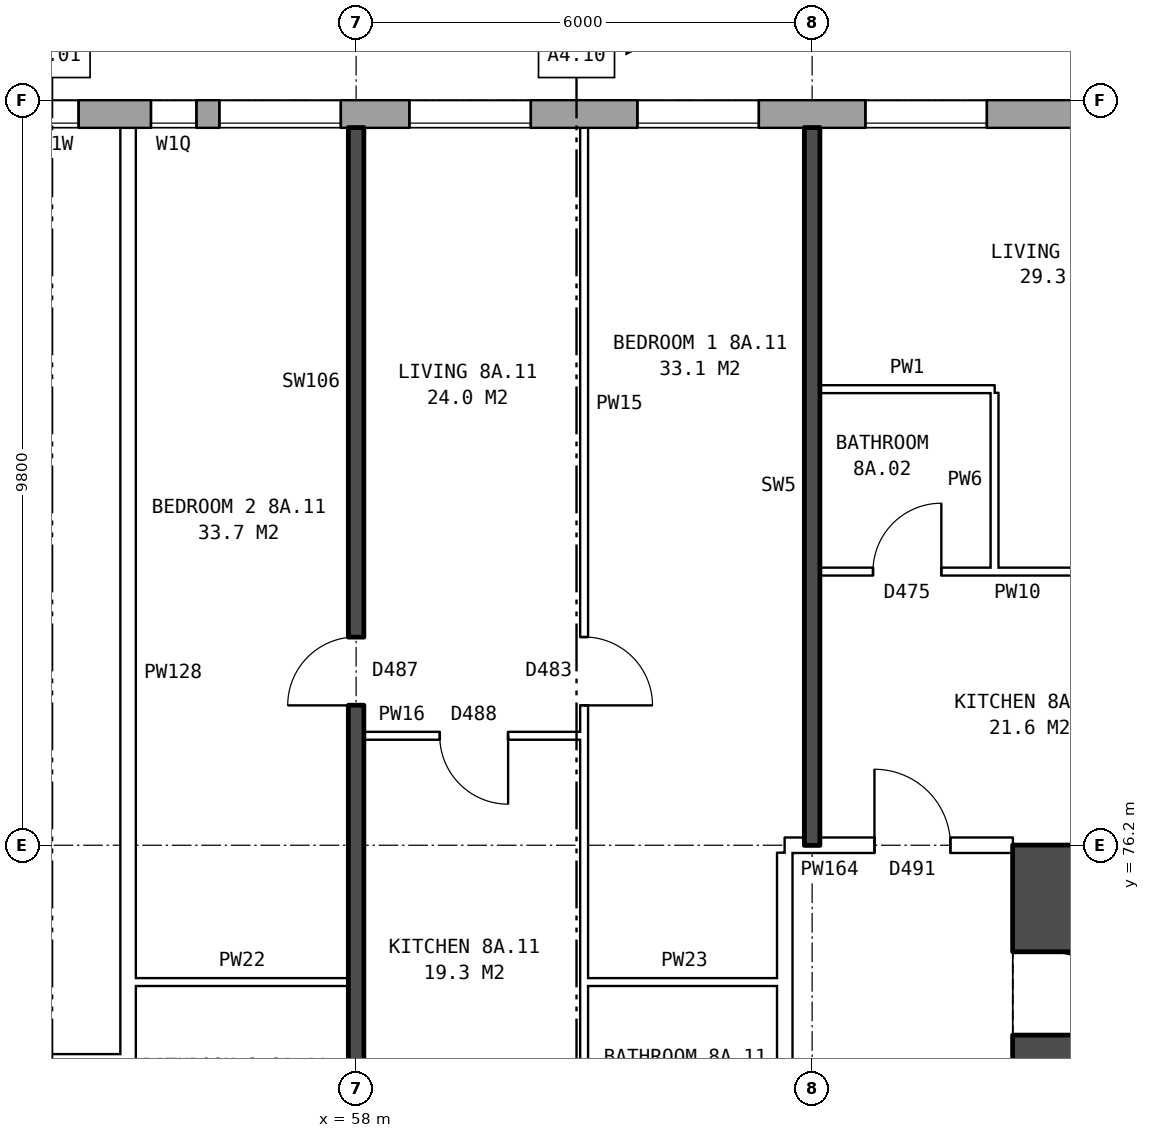
"""IFC4 building model, lengths in metres.
Left out: names, types, materials, properties, quantities, classifications, styles, units other than length and angle.
Written with IfcOpenShell. Run it as: python <this file> out.ifc"""

import sys

from ifc_helpers import new_model, si_unit, direction, frame, frame_2d, origin, place, context, subcontext, project, spatial, rectangle, extrude, element, fill, save


model = new_model("IFC4")
c1 = context("Model", 3, precision=1e-05, world=origin(), true_north=direction((0.0, 1.0)))
c2 = subcontext(c1, "Body", "Model", "MODEL_VIEW")
j1 = project(units=[si_unit("LENGTHUNIT", "METRE"), si_unit("PLANEANGLEUNIT", "RADIAN")], contexts=[c1])
p1 = place(None, origin())
s1 = spatial("IfcSite", under=j1, at=p1, CompositionType="ELEMENT")
p2 = place(p1, origin())
s2 = spatial("IfcBuilding", under=s1, at=p2, CompositionType="ELEMENT")
p3 = place(p2, frame((0.0, 0.0, 31.9)))
s3 = spatial("IfcBuildingStorey", under=s2, at=p3, CompositionType="ELEMENT", Elevation=31.9)
p4 = place(p3, frame((72.925, 85.82, 0.0), z_axis=(0.0, 0.0, 1.0), x_axis=(-1.0, 0.0, 0.0)))
e1 = element("IfcWall", 1, at=p4, inside=s3, PredefinedType="STANDARD", context=c2, shape_type="SweptSolid", body=[
    extrude(rectangle(XDim=50.101, YDim=0.36, at=frame_2d((25.05, 0.0))), origin(), (0.0, 0.0, 1.0), 2.85),
])
p5 = place(p4, frame((0.625, 0.0, 0.8)))
e2 = element("IfcOpeningElement", 2, at=p5, cuts=e1, PredefinedType="OPENING", context=c2, shape_type="SweptSolid", body=[
    extrude(rectangle(XDim=1.6, YDim=1.8, at=frame_2d((0.8, 0.9))), frame((0.0, 0.19, 0.0), z_axis=(0.0, -1.0, 0.0), x_axis=(1.0, 0.0, 0.0)), (0.0, 0.0, 1.0), 0.38),
])
p6 = place(p4, frame((3.625, 0.0, 0.8)))
e3 = element("IfcOpeningElement", 3, at=p6, cuts=e1, PredefinedType="OPENING", context=c2, shape_type="SweptSolid", body=[
    extrude(rectangle(XDim=1.6, YDim=1.8, at=frame_2d((0.8, 0.9))), frame((0.0, 0.19, 0.0), z_axis=(0.0, -1.0, 0.0), x_axis=(1.0, 0.0, 0.0)), (0.0, 0.0, 1.0), 0.38),
])
p7 = place(p4, frame((6.625, 0.0, 0.8)))
e4 = element("IfcOpeningElement", 4, at=p7, cuts=e1, PredefinedType="OPENING", context=c2, shape_type="SweptSolid", body=[
    extrude(rectangle(XDim=1.6, YDim=1.8, at=frame_2d((0.8, 0.9))), frame((0.0, 0.19, 0.0), z_axis=(0.0, -1.0, 0.0), x_axis=(1.0, 0.0, 0.0)), (0.0, 0.0, 1.0), 0.38),
])
p8 = place(p4, frame((9.625, 0.0, 0.8)))
e5 = element("IfcOpeningElement", 5, at=p8, cuts=e1, PredefinedType="OPENING", context=c2, shape_type="SweptSolid", body=[
    extrude(rectangle(XDim=1.6, YDim=1.8, at=frame_2d((0.8, 0.9))), frame((0.0, 0.19, 0.0), z_axis=(0.0, -1.0, 0.0), x_axis=(1.0, 0.0, 0.0)), (0.0, 0.0, 1.0), 0.38),
])
p9 = place(p4, frame((12.625, 0.0, 0.8)))
e6 = element("IfcOpeningElement", 6, at=p9, cuts=e1, PredefinedType="OPENING", context=c2, shape_type="SweptSolid", body=[
    extrude(rectangle(XDim=1.6, YDim=1.8, at=frame_2d((0.8, 0.9))), frame((0.0, 0.19, 0.0), z_axis=(0.0, -1.0, 0.0), x_axis=(1.0, 0.0, 0.0)), (0.0, 0.0, 1.0), 0.38),
])
p10 = place(p4, frame((15.125, 0.0, 0.8)))
e7 = element("IfcOpeningElement", 7, at=p10, cuts=e1, PredefinedType="OPENING", context=c2, shape_type="SweptSolid", body=[
    extrude(rectangle(XDim=1.6, YDim=1.8, at=frame_2d((0.8, 0.9))), frame((0.0, 0.19, 0.0), z_axis=(0.0, -1.0, 0.0), x_axis=(1.0, 0.0, 0.0)), (0.0, 0.0, 1.0), 0.38),
])
p11 = place(p4, frame((18.575, 0.0, 0.15)))
e8 = element("IfcOpeningElement", 8, at=p11, cuts=e1, PredefinedType="OPENING", context=c2, shape_type="SweptSolid", body=[
    extrude(rectangle(XDim=0.6, YDim=0.9, at=frame_2d((0.3, 0.45))), frame((0.0, 0.19, 0.0), z_axis=(0.0, -1.0, 0.0), x_axis=(1.0, 0.0, 0.0)), (0.0, 0.0, 1.0), 0.38),
])
p12 = place(p4, frame((21.625, 0.0, 0.8)))
e9 = element("IfcOpeningElement", 9, at=p12, cuts=e1, PredefinedType="OPENING", context=c2, shape_type="SweptSolid", body=[
    extrude(rectangle(XDim=1.6, YDim=1.8, at=frame_2d((0.8, 0.9))), frame((0.0, 0.19, 0.0), z_axis=(0.0, -1.0, 0.0), x_axis=(1.0, 0.0, 0.0)), (0.0, 0.0, 1.0), 0.38),
])
p13 = place(p4, frame((24.625, 0.0, 0.8)))
e10 = element("IfcOpeningElement", 10, at=p13, cuts=e1, PredefinedType="OPENING", context=c2, shape_type="SweptSolid", body=[
    extrude(rectangle(XDim=1.6, YDim=1.8, at=frame_2d((0.8, 0.9))), frame((0.0, 0.19, 0.0), z_axis=(0.0, -1.0, 0.0), x_axis=(1.0, 0.0, 0.0)), (0.0, 0.0, 1.0), 0.38),
])
p14 = place(p4, frame((27.625, 0.0, 0.8)))
e11 = element("IfcOpeningElement", 11, at=p14, cuts=e1, PredefinedType="OPENING", context=c2, shape_type="SweptSolid", body=[
    extrude(rectangle(XDim=1.6, YDim=1.8, at=frame_2d((0.8, 0.9))), frame((0.0, 0.19, 0.0), z_axis=(0.0, -1.0, 0.0), x_axis=(1.0, 0.0, 0.0)), (0.0, 0.0, 1.0), 0.38),
])
p15 = place(p4, frame((29.525, 0.0, 0.8)))
e12 = element("IfcOpeningElement", 12, at=p15, cuts=e1, PredefinedType="OPENING", context=c2, shape_type="SweptSolid", body=[
    extrude(rectangle(XDim=1.0, YDim=0.9, at=frame_2d((0.5, 0.45))), frame((0.0, 0.19, 0.0), z_axis=(0.0, -1.0, 0.0), x_axis=(1.0, 0.0, 0.0)), (0.0, 0.0, 1.0), 0.38),
])
p16 = place(p4, frame((33.625, 0.0, 0.8)))
e13 = element("IfcOpeningElement", 13, at=p16, cuts=e1, PredefinedType="OPENING", context=c2, shape_type="SweptSolid", body=[
    extrude(rectangle(XDim=1.6, YDim=1.8, at=frame_2d((0.8, 0.9))), frame((0.0, 0.19, 0.0), z_axis=(0.0, -1.0, 0.0), x_axis=(1.0, 0.0, 0.0)), (0.0, 0.0, 1.0), 0.38),
])
p17 = place(p4, frame((36.625, 0.0, 0.8)))
e14 = element("IfcOpeningElement", 14, at=p17, cuts=e1, PredefinedType="OPENING", context=c2, shape_type="SweptSolid", body=[
    extrude(rectangle(XDim=1.6, YDim=1.8, at=frame_2d((0.8, 0.9))), frame((0.0, 0.19, 0.0), z_axis=(0.0, -1.0, 0.0), x_axis=(1.0, 0.0, 0.0)), (0.0, 0.0, 1.0), 0.38),
])
p18 = place(p4, frame((39.625, 0.0, 0.8)))
e15 = element("IfcOpeningElement", 15, at=p18, cuts=e1, PredefinedType="OPENING", context=c2, shape_type="SweptSolid", body=[
    extrude(rectangle(XDim=1.6, YDim=1.8, at=frame_2d((0.8, 0.9))), frame((0.0, 0.19, 0.0), z_axis=(0.0, -1.0, 0.0), x_axis=(1.0, 0.0, 0.0)), (0.0, 0.0, 1.0), 0.38),
])
p19 = place(p4, frame((42.625, 0.0, 0.8)))
e16 = element("IfcOpeningElement", 16, at=p19, cuts=e1, PredefinedType="OPENING", context=c2, shape_type="SweptSolid", body=[
    extrude(rectangle(XDim=1.6, YDim=1.8, at=frame_2d((0.8, 0.9))), frame((0.0, 0.19, 0.0), z_axis=(0.0, -1.0, 0.0), x_axis=(1.0, 0.0, 0.0)), (0.0, 0.0, 1.0), 0.38),
])
p20 = place(p4, frame((45.625, 0.0, 0.8)))
e17 = element("IfcOpeningElement", 17, at=p20, cuts=e1, PredefinedType="OPENING", context=c2, shape_type="SweptSolid", body=[
    extrude(rectangle(XDim=1.6, YDim=1.8, at=frame_2d((0.8, 0.9))), frame((0.0, 0.19, 0.0), z_axis=(0.0, -1.0, 0.0), x_axis=(1.0, 0.0, 0.0)), (0.0, 0.0, 1.0), 0.38),
])
p21 = place(p4, frame((17.025, 0.0, 1.4)))
e18 = element("IfcOpeningElement", 18, at=p21, cuts=e1, PredefinedType="OPENING", context=c2, shape_type="SweptSolid", body=[
    extrude(rectangle(XDim=0.6, YDim=1.2, at=frame_2d((0.3, 0.6))), frame((0.0, 0.19, 0.0), z_axis=(0.0, -1.0, 0.0), x_axis=(1.0, 0.0, 0.0)), (0.0, 0.0, 1.0), 0.38),
])
p22 = place(p4, frame((19.475, 0.0, 0.15)))
e19 = element("IfcOpeningElement", 19, at=p22, cuts=e1, PredefinedType="OPENING", context=c2, shape_type="SweptSolid", body=[
    extrude(rectangle(XDim=1.2, YDim=1.5, at=frame_2d((0.6, 0.75))), frame((0.0, 0.19, 0.0), z_axis=(0.0, -1.0, 0.0), x_axis=(1.0, 0.0, 0.0)), (0.0, 0.0, 1.0), 0.38),
])
p23 = place(p4, frame((31.975, 0.0, 1.7)))
e20 = element("IfcOpeningElement", 20, at=p23, cuts=e1, PredefinedType="OPENING", context=c2, shape_type="SweptSolid", body=[
    extrude(rectangle(XDim=0.6, YDim=0.9, at=frame_2d((0.3, 0.45))), frame((0.0, 0.19, 0.0), z_axis=(0.0, -1.0, 0.0), x_axis=(1.0, 0.0, 0.0)), (0.0, 0.0, 1.0), 0.38),
])
p24 = place(p3, frame((67.09, 64.7, 0.0), z_axis=(0.0, 0.0, 1.0), x_axis=(0.0, 1.0, 0.0)))
e21 = element("IfcWall", 21, at=p24, inside=s3, PredefinedType="SHEAR", context=c2, shape_type="SweptSolid", body=[
    extrude(rectangle(XDim=10.6, YDim=0.9, at=frame_2d((5.3, 0.0))), origin(), (0.0, 0.0, 1.0), 2.85),
])
p25 = place(p24, frame((0.425, 0.0, 0.0)))
e22 = element("IfcOpeningElement", 22, at=p25, cuts=e21, PredefinedType="OPENING", context=c2, shape_type="SweptSolid", body=[
    extrude(rectangle(XDim=1.1, YDim=2.1, at=frame_2d((0.55, 1.05))), frame((0.0, 0.46, 0.0), z_axis=(0.0, -1.0, 0.0), x_axis=(1.0, 0.0, 0.0)), (0.0, 0.0, 1.0), 0.92),
])
p26 = place(p24, frame((9.0, 0.0, 0.0)))
e23 = element("IfcOpeningElement", 23, at=p26, cuts=e21, PredefinedType="OPENING", context=c2, shape_type="SweptSolid", body=[
    extrude(rectangle(XDim=1.1, YDim=2.1, at=frame_2d((0.55, 1.05))), frame((0.0, 0.46, 0.0), z_axis=(0.0, -1.0, 0.0), x_axis=(1.0, 0.0, 0.0)), (0.0, 0.0, 1.0), 0.92),
])
p27 = place(p3, frame((66.64, 75.75, 0.0), z_axis=(0.0, 0.0, 1.0), x_axis=(1.0, 0.0, 0.0)))
e24 = element("IfcWall", 24, at=p27, inside=s3, PredefinedType="SHEAR", context=c2, shape_type="SweptSolid", body=[
    extrude(rectangle(XDim=9.0, YDim=0.9, at=frame_2d((4.5, 0.0))), origin(), (0.0, 0.0, 1.0), 2.85),
])
p28 = place(p3, frame((63.64, 63.9, 0.0), z_axis=(0.0, 0.0, 1.0), x_axis=(0.0, 1.0, 0.0)))
e25 = element("IfcWall", 25, at=p28, inside=s3, PredefinedType="PARTITIONING", context=c2, shape_type="SweptSolid", body=[
    extrude(rectangle(XDim=12.2, YDim=0.2, at=frame_2d((6.1, 0.0))), origin(), (0.0, 0.0, 1.0), 2.85),
])
p29 = place(p28, frame((5.1, 0.0, 0.0)))
e26 = element("IfcOpeningElement", 26, at=p29, cuts=e25, PredefinedType="OPENING", context=c2, shape_type="SweptSolid", body=[
    extrude(rectangle(XDim=2.0, YDim=2.1, at=frame_2d((1.0, 1.05))), frame((0.0, 0.11, 0.0), z_axis=(0.0, -1.0, 0.0), x_axis=(1.0, 0.0, 0.0)), (0.0, 0.0, 1.0), 0.22),
])
for number, where, z_axis, x_axis in (
    (27, (52.1, 73.4, 0.0), (0.0, 0.0, 1.0), (1.0, 0.0, 0.0)),
    (28, (55.1, 74.4, 0.0), (0.0, 0.0, 1.0), (1.0, 0.0, 0.0)),
):
    element("IfcWall", number, at=place(p3, frame(where, z_axis=z_axis, x_axis=x_axis)), inside=s3, PredefinedType="PARTITIONING", context=c2, shape_type="SweptSolid", body=[
        extrude(rectangle(XDim=2.8, YDim=0.1, at=frame_2d((1.4, 0.0))), origin(), (0.0, 0.0, 1.0), 2.85),
    ])
p30 = place(p3, frame((61.0, 74.4, 0.0), z_axis=(0.0, 0.0, 1.0), x_axis=(1.0, 0.0, 0.0)))
e29 = element("IfcWall", 29, at=p30, inside=s3, PredefinedType="PARTITIONING", context=c2, shape_type="SweptSolid", body=[
    extrude(rectangle(XDim=2.64, YDim=0.1, at=frame_2d((1.32, 0.0))), origin(), (0.0, 0.0, 1.0), 2.85),
])
p31 = place(p3, frame((63.64, 76.2, 0.0), z_axis=(0.0, 0.0, 1.0), x_axis=(1.0, 0.0, 0.0)))
e30 = element("IfcWall", 30, at=p31, inside=s3, PredefinedType="PARTITIONING", context=c2, shape_type="SweptSolid", body=[
    extrude(rectangle(XDim=3.0, YDim=0.2, at=frame_2d((1.5, 0.0))), origin(), (0.0, 0.0, 1.0), 2.85),
])
p32 = place(p31, frame((1.18, 0.0, 0.0)))
e31 = element("IfcOpeningElement", 31, at=p32, cuts=e30, PredefinedType="OPENING", context=c2, shape_type="SweptSolid", body=[
    extrude(rectangle(XDim=1.0, YDim=2.1, at=frame_2d((0.5, 1.05))), frame((0.0, 0.11, 0.0), z_axis=(0.0, -1.0, 0.0), x_axis=(1.0, 0.0, 0.0)), (0.0, 0.0, 1.0), 0.22),
])
p33 = place(p3, frame((58.1, 77.64, 0.0), z_axis=(0.0, 0.0, 1.0), x_axis=(1.0, 0.0, 0.0)))
e32 = element("IfcWall", 32, at=p33, inside=s3, PredefinedType="PARTITIONING", context=c2, shape_type="SweptSolid", body=[
    extrude(rectangle(XDim=2.9, YDim=0.1, at=frame_2d((1.45, 0.0))), origin(), (0.0, 0.0, 1.0), 2.85),
])
p34 = place(p33, frame((1.0, 0.0, 0.0)))
e33 = element("IfcOpeningElement", 33, at=p34, cuts=e32, PredefinedType="OPENING", context=c2, shape_type="SweptSolid", body=[
    extrude(rectangle(XDim=0.9, YDim=2.1, at=frame_2d((0.45, 1.05))), frame((0.0, 0.06, 0.0), z_axis=(0.0, -1.0, 0.0), x_axis=(1.0, 0.0, 0.0)), (0.0, 0.0, 1.0), 0.12),
])
p35 = place(p3, frame((64.1, 79.8, 0.0), z_axis=(0.0, 0.0, 1.0), x_axis=(1.0, 0.0, 0.0)))
e34 = element("IfcWall", 34, at=p35, inside=s3, PredefinedType="PARTITIONING", context=c2, shape_type="SweptSolid", body=[
    extrude(rectangle(XDim=5.8, YDim=0.1, at=frame_2d((2.9, 0.0))), origin(), (0.0, 0.0, 1.0), 2.85),
])
p36 = place(p35, frame((3.6, 0.0, 0.0)))
e35 = element("IfcOpeningElement", 35, at=p36, cuts=e34, PredefinedType="OPENING", context=c2, shape_type="SweptSolid", body=[
    extrude(rectangle(XDim=0.9, YDim=2.1, at=frame_2d((0.45, 1.05))), frame((0.0, 0.06, 0.0), z_axis=(0.0, -1.0, 0.0), x_axis=(1.0, 0.0, 0.0)), (0.0, 0.0, 1.0), 0.12),
])
p37 = place(p35, frame((0.7, 0.0, 0.0)))
e36 = element("IfcOpeningElement", 36, at=p37, cuts=e34, PredefinedType="OPENING", context=c2, shape_type="SweptSolid", body=[
    extrude(rectangle(XDim=0.9, YDim=2.1, at=frame_2d((0.45, 1.05))), frame((0.0, 0.06, 0.0), z_axis=(0.0, -1.0, 0.0), x_axis=(1.0, 0.0, 0.0)), (0.0, 0.0, 1.0), 0.12),
])
p38 = place(p3, frame((64.1, 82.2, 0.0), z_axis=(0.0, 0.0, 1.0), x_axis=(1.0, 0.0, 0.0)))
e37 = element("IfcWall", 37, at=p38, inside=s3, PredefinedType="PARTITIONING", context=c2, shape_type="SweptSolid", body=[
    extrude(rectangle(XDim=2.3, YDim=0.1, at=frame_2d((1.15, 0.0))), origin(), (0.0, 0.0, 1.0), 2.85),
])
p39 = place(p3, frame((55.0, 71.3, 0.0), z_axis=(0.0, 0.0, 1.0), x_axis=(0.0, 1.0, 0.0)))
e38 = element("IfcWall", 38, at=p39, inside=s3, PredefinedType="PARTITIONING", context=c2, shape_type="SweptSolid", body=[
    extrude(rectangle(XDim=14.34, YDim=0.2, at=frame_2d((7.17, 0.0))), origin(), (0.0, 0.0, 1.0), 2.85),
])
p40 = place(p3, frame((58.0, 71.2, 0.0), z_axis=(0.0, 0.0, 1.0), x_axis=(0.0, 1.0, 0.0)))
e39 = element("IfcWall", 39, at=p40, inside=s3, PredefinedType="SOLIDWALL", context=c2, shape_type="SweptSolid", body=[
    extrude(rectangle(XDim=14.44, YDim=0.2, at=frame_2d((7.22, 0.0))), origin(), (0.0, 0.0, 1.0), 2.85),
])
p41 = place(p40, frame((6.84, 0.0, 0.0)))
e40 = element("IfcOpeningElement", 40, at=p41, cuts=e39, PredefinedType="OPENING", context=c2, shape_type="SweptSolid", body=[
    extrude(rectangle(XDim=0.9, YDim=2.1, at=frame_2d((0.45, 1.05))), frame((0.0, 0.11, 0.0), z_axis=(0.0, -1.0, 0.0), x_axis=(1.0, 0.0, 0.0)), (0.0, 0.0, 1.0), 0.22),
])
p42 = place(p40, frame((0.4, 0.0, 0.0)))
e41 = element("IfcOpeningElement", 41, at=p42, cuts=e39, PredefinedType="OPENING", context=c2, shape_type="SweptSolid", body=[
    extrude(rectangle(XDim=0.9, YDim=2.1, at=frame_2d((0.45, 1.05))), frame((0.0, 0.11, 0.0), z_axis=(0.0, -1.0, 0.0), x_axis=(1.0, 0.0, 0.0)), (0.0, 0.0, 1.0), 0.22),
])
p43 = place(p3, frame((61.0, 71.3, 0.0), z_axis=(0.0, 0.0, 1.0), x_axis=(0.0, 1.0, 0.0)))
e42 = element("IfcWall", 42, at=p43, inside=s3, PredefinedType="PARTITIONING", context=c2, shape_type="SweptSolid", body=[
    extrude(rectangle(XDim=14.34, YDim=0.1, at=frame_2d((7.17, 0.0))), origin(), (0.0, 0.0, 1.0), 2.85),
])
p44 = place(p43, frame((6.74, 0.0, 0.0)))
e43 = element("IfcOpeningElement", 43, at=p44, cuts=e42, PredefinedType="OPENING", context=c2, shape_type="SweptSolid", body=[
    extrude(rectangle(XDim=0.9, YDim=2.1, at=frame_2d((0.45, 1.05))), frame((0.0, 0.06, 0.0), z_axis=(0.0, -1.0, 0.0), x_axis=(1.0, 0.0, 0.0)), (0.0, 0.0, 1.0), 0.12),
])
p45 = place(p43, frame((0.4, 0.0, 0.0)))
e44 = element("IfcOpeningElement", 44, at=p45, cuts=e42, PredefinedType="OPENING", context=c2, shape_type="SweptSolid", body=[
    extrude(rectangle(XDim=0.9, YDim=2.1, at=frame_2d((0.45, 1.05))), frame((0.0, 0.06, 0.0), z_axis=(0.0, -1.0, 0.0), x_axis=(1.0, 0.0, 0.0)), (0.0, 0.0, 1.0), 0.12),
])
p46 = place(p3, frame((64.0, 76.2, 0.0), z_axis=(0.0, 0.0, 1.0), x_axis=(0.0, 1.0, 0.0)))
e45 = element("IfcWall", 45, at=p46, inside=s3, PredefinedType="SOLIDWALL", context=c2, shape_type="SweptSolid", body=[
    extrude(rectangle(XDim=9.44, YDim=0.2, at=frame_2d((4.72, 0.0))), origin(), (0.0, 0.0, 1.0), 2.85),
])
p47 = place(p3, frame((66.4, 79.85, 0.0), z_axis=(0.0, 0.0, 1.0), x_axis=(0.0, 1.0, 0.0)))
e46 = element("IfcWall", 46, at=p47, inside=s3, PredefinedType="PARTITIONING", context=c2, shape_type="SweptSolid", body=[
    extrude(rectangle(XDim=2.3, YDim=0.1, at=frame_2d((1.15, 0.0))), origin(), (0.0, 0.0, 1.0), 2.85),
])
p48 = place(p7, origin())
e47 = element("IfcWindow", 47, at=p48, inside=s3, PartitioningType="SINGLE_PANEL", PredefinedType="WINDOW", context=c2, shape_type="SweptSolid", body=[
    extrude(rectangle(XDim=1.6, YDim=1.8, at=frame_2d((0.8, 0.9))), frame((0.0, 0.15, 0.0), z_axis=(0.0, -1.0, 0.0), x_axis=(1.0, 0.0, 0.0)), (0.0, 0.0, 1.0), 0.06),
])
fill(e4, e47)
p49 = place(p8, origin())
e48 = element("IfcWindow", 48, at=p49, inside=s3, PartitioningType="SINGLE_PANEL", PredefinedType="WINDOW", context=c2, shape_type="SweptSolid", body=[
    extrude(rectangle(XDim=1.6, YDim=1.8, at=frame_2d((0.8, 0.9))), frame((0.0, 0.15, 0.0), z_axis=(0.0, -1.0, 0.0), x_axis=(1.0, 0.0, 0.0)), (0.0, 0.0, 1.0), 0.06),
])
fill(e5, e48)
p50 = place(p9, origin())
e49 = element("IfcWindow", 49, at=p50, inside=s3, PartitioningType="SINGLE_PANEL", PredefinedType="WINDOW", context=c2, shape_type="SweptSolid", body=[
    extrude(rectangle(XDim=1.6, YDim=1.8, at=frame_2d((0.8, 0.9))), frame((0.0, 0.15, 0.0), z_axis=(0.0, -1.0, 0.0), x_axis=(1.0, 0.0, 0.0)), (0.0, 0.0, 1.0), 0.06),
])
fill(e6, e49)
p51 = place(p10, origin())
e50 = element("IfcWindow", 50, at=p51, inside=s3, PartitioningType="SINGLE_PANEL", PredefinedType="WINDOW", context=c2, shape_type="SweptSolid", body=[
    extrude(rectangle(XDim=1.6, YDim=1.8, at=frame_2d((0.8, 0.9))), frame((0.0, 0.15, 0.0), z_axis=(0.0, -1.0, 0.0), x_axis=(1.0, 0.0, 0.0)), (0.0, 0.0, 1.0), 0.06),
])
fill(e7, e50)
p52 = place(p11, origin())
e51 = element("IfcWindow", 51, at=p52, inside=s3, PartitioningType="SINGLE_PANEL", PredefinedType="WINDOW", context=c2, shape_type="SweptSolid", body=[
    extrude(rectangle(XDim=0.6, YDim=0.9, at=frame_2d((0.3, 0.45))), frame((0.0, 0.15, 0.0), z_axis=(0.0, -1.0, 0.0), x_axis=(1.0, 0.0, 0.0)), (0.0, 0.0, 1.0), 0.06),
])
fill(e8, e51)
p53 = place(p32, origin())
e52 = element("IfcDoor", 52, at=p53, inside=s3, OperationType="SINGLE_SWING_LEFT", PredefinedType="DOOR", context=c2, shape_type="SweptSolid", body=[
    extrude(rectangle(XDim=1.0, YDim=2.1, at=frame_2d((0.5, 1.05))), frame((0.0, 0.025, 0.0), z_axis=(0.0, -1.0, 0.0), x_axis=(1.0, 0.0, 0.0)), (0.0, 0.0, 1.0), 0.05),
])
fill(e31, e52)
p54 = place(p37, origin())
e53 = element("IfcDoor", 53, at=p54, inside=s3, OperationType="SINGLE_SWING_RIGHT", PredefinedType="DOOR", context=c2, shape_type="SweptSolid", body=[
    extrude(rectangle(XDim=0.9, YDim=2.1, at=frame_2d((0.45, 1.05))), frame((0.0, 0.025, 0.0), z_axis=(0.0, -1.0, 0.0), x_axis=(1.0, 0.0, 0.0)), (0.0, 0.0, 1.0), 0.05),
])
fill(e36, e53)
p55 = place(p44, frame((0.9, 0.0, 0.0), z_axis=(0.0, 0.0, 1.0), x_axis=(-1.0, 0.0, 0.0)))
e54 = element("IfcDoor", 54, at=p55, inside=s3, OperationType="SINGLE_SWING_RIGHT", PredefinedType="DOOR", context=c2, shape_type="SweptSolid", body=[
    extrude(rectangle(XDim=0.9, YDim=2.1, at=frame_2d((0.45, 1.05))), frame((0.0, 0.025, 0.0), z_axis=(0.0, -1.0, 0.0), x_axis=(1.0, 0.0, 0.0)), (0.0, 0.0, 1.0), 0.05),
])
fill(e43, e54)
p56 = place(p41, origin())
e55 = element("IfcDoor", 55, at=p56, inside=s3, OperationType="SINGLE_SWING_LEFT", PredefinedType="DOOR", context=c2, shape_type="SweptSolid", body=[
    extrude(rectangle(XDim=0.9, YDim=2.1, at=frame_2d((0.45, 1.05))), frame((0.0, 0.025, 0.0), z_axis=(0.0, -1.0, 0.0), x_axis=(1.0, 0.0, 0.0)), (0.0, 0.0, 1.0), 0.05),
])
fill(e40, e55)
p57 = place(p34, frame((0.9, 0.0, 0.0), z_axis=(0.0, 0.0, 1.0), x_axis=(-1.0, 0.0, 0.0)))
e56 = element("IfcDoor", 56, at=p57, inside=s3, OperationType="SINGLE_SWING_LEFT", PredefinedType="DOOR", context=c2, shape_type="SweptSolid", body=[
    extrude(rectangle(XDim=0.9, YDim=2.1, at=frame_2d((0.45, 1.05))), frame((0.0, 0.025, 0.0), z_axis=(0.0, -1.0, 0.0), x_axis=(1.0, 0.0, 0.0)), (0.0, 0.0, 1.0), 0.05),
])
fill(e33, e56)
p58 = place(p21, origin())
e57 = element("IfcWindow", 57, at=p58, inside=s3, PartitioningType="SINGLE_PANEL", PredefinedType="WINDOW", context=c2, shape_type="SweptSolid", body=[
    extrude(rectangle(XDim=0.6, YDim=1.2, at=frame_2d((0.3, 0.6))), frame((0.0, 0.15, 0.0), z_axis=(0.0, -1.0, 0.0), x_axis=(1.0, 0.0, 0.0)), (0.0, 0.0, 1.0), 0.06),
])
fill(e18, e57)
save(model, sys.argv[1])
